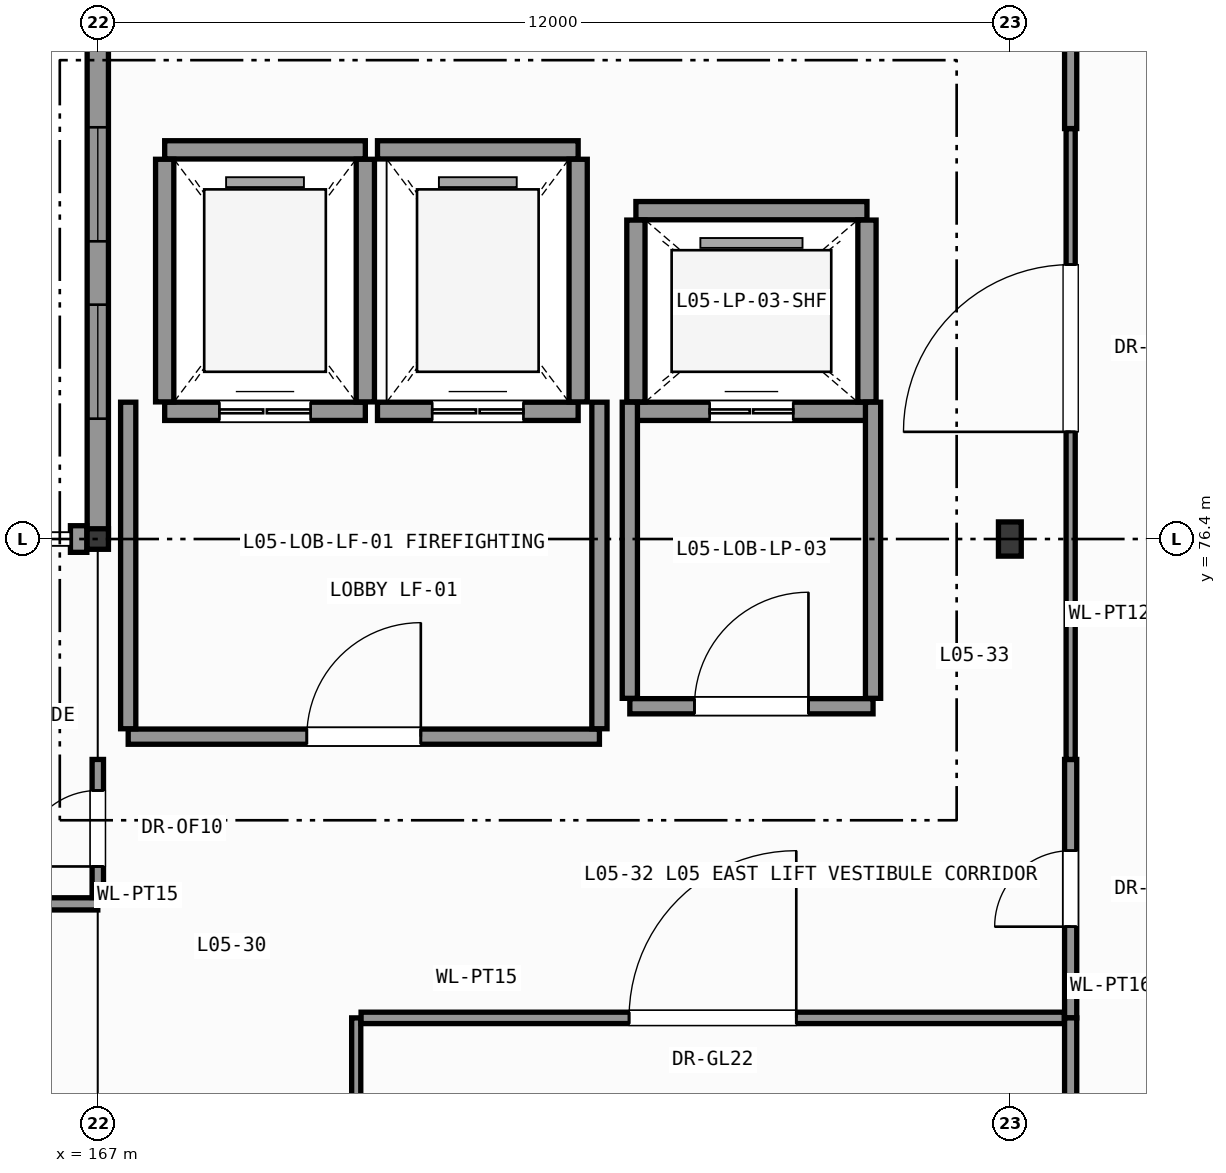
"""IFC4 building model, lengths in metres.
Left out: names, types, materials, properties, quantities, classifications, styles, units other than length and angle.
Written with IfcOpenShell. Run it as: python <this file> out.ifc"""

import sys

from ifc_helpers import new_model, si_unit, direction, frame, frame_2d, origin, origin_2d, place, context, subcontext, project, spatial, rectangle, i_section, extrude, element, fill, save


model = new_model("IFC4")
c1 = context("Model", 3, precision=1e-05, world=origin(), true_north=direction((0.0, 1.0)))
c2 = subcontext(c1, "Body", "Model", "MODEL_VIEW")
j1 = project(units=[si_unit("LENGTHUNIT", "METRE"), si_unit("PLANEANGLEUNIT", "RADIAN")], contexts=[c1])
p1 = place(None, origin())
s1 = spatial("IfcSite", under=j1, at=p1, CompositionType="ELEMENT")
p2 = place(p1, origin())
s2 = spatial("IfcBuilding", under=s1, at=p2, CompositionType="ELEMENT")
p3 = place(p2, frame((0.0, 0.0, 22.2)))
s3 = spatial("IfcBuildingStorey", under=s2, at=p3, CompositionType="ELEMENT", Elevation=22.2)
p4 = place(p3, frame((167.0, 76.4, 0.0), z_axis=(0.0, 0.0, 1.0), x_axis=(1.0, 0.0, 0.0)))
e1 = element("IfcColumn", 1, at=p4, inside=s3, PredefinedType="COLUMN", context=c2, shape_type="SweptSolid", body=[
    extrude(i_section(OverallWidth=0.28, OverallDepth=0.27, WebThickness=0.008, FlangeThickness=0.013, FilletRadius=0.024, at=origin_2d()), origin(), (0.0, 0.0, 1.0), 4.2),
])
p5 = place(p3, frame((179.0, 76.4, 0.0), z_axis=(0.0, 0.0, 1.0), x_axis=(1.0, 0.0, 0.0)))
e2 = element("IfcColumn", 2, at=p5, inside=s3, PredefinedType="COLUMN", context=c2, shape_type="SweptSolid", body=[
    extrude(i_section(OverallWidth=0.3, OverallDepth=0.45, WebThickness=0.014, FlangeThickness=0.026, FilletRadius=0.027, at=origin_2d()), origin(), (0.0, 0.0, 1.0), 4.2),
])
p6 = place(p3, frame((167.0, 76.4, 0.0), z_axis=(0.0, 0.0, 1.0), x_axis=(0.0, 1.0, 0.0)))
e3 = element("IfcWall", 3, at=p6, inside=s3, PredefinedType="SOLIDWALL", context=c2, shape_type="SweptSolid", body=[
    extrude(rectangle(XDim=7.0, YDim=0.28, at=frame_2d((3.5, 0.0))), origin(), (0.0, 0.0, 1.0), 3.675),
])
p7 = place(p6, frame((1.583, 0.0, 0.95)))
e4 = element("IfcOpeningElement", 4, at=p7, cuts=e3, PredefinedType="OPENING", context=c2, shape_type="SweptSolid", body=[
    extrude(rectangle(XDim=1.5, YDim=2.33, at=frame_2d((0.75, 1.165))), frame((0.0, 0.15, 0.0), z_axis=(0.0, -1.0, 0.0), x_axis=(1.0, 0.0, 0.0)), (0.0, 0.0, 1.0), 0.3),
])
p8 = place(p6, frame((3.917, 0.0, 0.95)))
e5 = element("IfcOpeningElement", 5, at=p8, cuts=e3, PredefinedType="OPENING", context=c2, shape_type="SweptSolid", body=[
    extrude(rectangle(XDim=1.5, YDim=2.33, at=frame_2d((0.75, 1.165))), frame((0.0, 0.15, 0.0), z_axis=(0.0, -1.0, 0.0), x_axis=(1.0, 0.0, 0.0)), (0.0, 0.0, 1.0), 0.3),
])
p9 = place(p3, frame((166.856, 76.4, 0.0), z_axis=(0.0, 0.0, 1.0), x_axis=(-1.0, 0.0, 0.0)))
e6 = element("IfcWall", 6, at=p9, inside=s3, PredefinedType="SOLIDWALL", context=c2, shape_type="SweptSolid", body=[
    extrude(rectangle(XDim=0.216, YDim=0.35, at=frame_2d((0.108, 0.0))), origin(), (0.0, 0.0, 1.0), 3.98),
])
p10 = place(p3, frame((167.88, 78.08, 0.0), z_axis=(0.0, 0.0, 1.0), x_axis=(1.0, 0.0, 0.0)))
e7 = element("IfcWall", 7, at=p10, inside=s3, PredefinedType="SHEAR", context=c2, shape_type="SweptSolid", body=[
    extrude(rectangle(XDim=2.64, YDim=0.24, at=frame_2d((1.32, 0.0))), origin(), (0.0, 0.0, 1.0), 3.98),
])
p11 = place(p10, frame((0.72, 0.0, 0.0)))
e8 = element("IfcOpeningElement", 8, at=p11, cuts=e7, PredefinedType="OPENING", context=c2, shape_type="SweptSolid", body=[
    extrude(rectangle(XDim=1.2, YDim=2.2, at=frame_2d((0.6, 1.1))), frame((0.0, 0.13, 0.0), z_axis=(0.0, -1.0, 0.0), x_axis=(1.0, 0.0, 0.0)), (0.0, 0.0, 1.0), 0.26),
])
p12 = place(p3, frame((167.88, 81.52, 0.0), z_axis=(0.0, 0.0, 1.0), x_axis=(1.0, 0.0, 0.0)))
e9 = element("IfcWall", 9, at=p12, inside=s3, PredefinedType="SHEAR", context=c2, shape_type="SweptSolid", body=[
    extrude(rectangle(XDim=2.64, YDim=0.24, at=frame_2d((1.32, 0.0))), origin(), (0.0, 0.0, 1.0), 3.98),
])
for number, where, z_axis, x_axis in (
    (10, (167.88, 78.204, 0.0), (0.0, 0.0, 1.0), (0.0, 1.0, 0.0)),
    (11, (170.52, 78.204, 0.0), (0.0, 0.0, 1.0), (0.0, 1.0, 0.0)),
):
    element("IfcWall", number, at=place(p3, frame(where, z_axis=z_axis, x_axis=x_axis)), inside=s3, PredefinedType="SHEAR", context=c2, shape_type="SweptSolid", body=[
        extrude(rectangle(XDim=3.192, YDim=0.24, at=frame_2d((1.596, 0.0))), origin(), (0.0, 0.0, 1.0), 3.98),
    ])
p13 = place(p3, frame((170.68, 78.08, 0.0), z_axis=(0.0, 0.0, 1.0), x_axis=(1.0, 0.0, 0.0)))
e12 = element("IfcWall", 12, at=p13, inside=s3, PredefinedType="SHEAR", context=c2, shape_type="SweptSolid", body=[
    extrude(rectangle(XDim=2.64, YDim=0.24, at=frame_2d((1.32, 0.0))), origin(), (0.0, 0.0, 1.0), 3.98),
])
p14 = place(p13, frame((0.72, 0.0, 0.0)))
e13 = element("IfcOpeningElement", 13, at=p14, cuts=e12, PredefinedType="OPENING", context=c2, shape_type="SweptSolid", body=[
    extrude(rectangle(XDim=1.2, YDim=2.2, at=frame_2d((0.6, 1.1))), frame((0.0, 0.13, 0.0), z_axis=(0.0, -1.0, 0.0), x_axis=(1.0, 0.0, 0.0)), (0.0, 0.0, 1.0), 0.26),
])
p15 = place(p3, frame((170.68, 81.52, 0.0), z_axis=(0.0, 0.0, 1.0), x_axis=(1.0, 0.0, 0.0)))
e14 = element("IfcWall", 14, at=p15, inside=s3, PredefinedType="SHEAR", context=c2, shape_type="SweptSolid", body=[
    extrude(rectangle(XDim=2.64, YDim=0.24, at=frame_2d((1.32, 0.0))), origin(), (0.0, 0.0, 1.0), 3.98),
])
p16 = place(p3, frame((173.32, 78.204, 0.0), z_axis=(0.0, 0.0, 1.0), x_axis=(0.0, 1.0, 0.0)))
e15 = element("IfcWall", 15, at=p16, inside=s3, PredefinedType="SHEAR", context=c2, shape_type="SweptSolid", body=[
    extrude(rectangle(XDim=3.192, YDim=0.24, at=frame_2d((1.596, 0.0))), origin(), (0.0, 0.0, 1.0), 3.98),
])
p17 = place(p3, frame((174.08, 78.08, 0.0), z_axis=(0.0, 0.0, 1.0), x_axis=(1.0, 0.0, 0.0)))
e16 = element("IfcWall", 16, at=p17, inside=s3, PredefinedType="SHEAR", context=c2, shape_type="SweptSolid", body=[
    extrude(rectangle(XDim=3.04, YDim=0.24, at=frame_2d((1.52, 0.0))), origin(), (0.0, 0.0, 1.0), 3.98),
])
p18 = place(p17, frame((0.97, 0.0, 0.0)))
e17 = element("IfcOpeningElement", 17, at=p18, cuts=e16, PredefinedType="OPENING", context=c2, shape_type="SweptSolid", body=[
    extrude(rectangle(XDim=1.1, YDim=2.2, at=frame_2d((0.55, 1.1))), frame((0.0, 0.13, 0.0), z_axis=(0.0, -1.0, 0.0), x_axis=(1.0, 0.0, 0.0)), (0.0, 0.0, 1.0), 0.26),
])
p19 = place(p3, frame((174.08, 80.72, 0.0), z_axis=(0.0, 0.0, 1.0), x_axis=(1.0, 0.0, 0.0)))
e18 = element("IfcWall", 18, at=p19, inside=s3, PredefinedType="SHEAR", context=c2, shape_type="SweptSolid", body=[
    extrude(rectangle(XDim=3.04, YDim=0.24, at=frame_2d((1.52, 0.0))), origin(), (0.0, 0.0, 1.0), 3.98),
])
for number, where, z_axis, x_axis in (
    (19, (174.08, 78.204, 0.0), (0.0, 0.0, 1.0), (0.0, 1.0, 0.0)),
    (20, (177.12, 78.204, 0.0), (0.0, 0.0, 1.0), (0.0, 1.0, 0.0)),
):
    element("IfcWall", number, at=place(p3, frame(where, z_axis=z_axis, x_axis=x_axis)), inside=s3, PredefinedType="SHEAR", context=c2, shape_type="SweptSolid", body=[
        extrude(rectangle(XDim=2.392, YDim=0.24, at=frame_2d((1.196, 0.0))), origin(), (0.0, 0.0, 1.0), 3.98),
    ])
p20 = place(p3, frame((167.4, 73.8, 0.0), z_axis=(0.0, 0.0, 1.0), x_axis=(1.0, 0.0, 0.0)))
e21 = element("IfcWall", 21, at=p20, inside=s3, PredefinedType="PARTITIONING", context=c2, shape_type="SweptSolid", body=[
    extrude(rectangle(XDim=6.2, YDim=0.2, at=frame_2d((3.1, 0.0))), origin(), (0.0, 0.0, 1.0), 3.605),
])
p21 = place(p20, frame((2.35, 0.0, 0.0)))
e22 = element("IfcOpeningElement", 22, at=p21, cuts=e21, PredefinedType="OPENING", context=c2, shape_type="SweptSolid", body=[
    extrude(rectangle(XDim=1.5, YDim=2.2, at=frame_2d((0.75, 1.1))), frame((0.0, 0.11, 0.0), z_axis=(0.0, -1.0, 0.0), x_axis=(1.0, 0.0, 0.0)), (0.0, 0.0, 1.0), 0.22),
])
for number, where, z_axis, x_axis in (
    (23, (167.4, 73.904, 0.0), (0.0, 0.0, 1.0), (0.0, 1.0, 0.0)),
    (24, (173.6, 73.904, 0.0), (0.0, 0.0, 1.0), (0.0, 1.0, 0.0)),
):
    element("IfcWall", number, at=place(p3, frame(where, z_axis=z_axis, x_axis=x_axis)), inside=s3, PredefinedType="PARTITIONING", context=c2, shape_type="SweptSolid", body=[
        extrude(rectangle(XDim=4.296, YDim=0.2, at=frame_2d((2.148, 0.0))), origin(), (0.0, 0.0, 1.0), 3.98),
    ])
p22 = place(p3, frame((174.0, 74.2, 0.0), z_axis=(0.0, 0.0, 1.0), x_axis=(1.0, 0.0, 0.0)))
e25 = element("IfcWall", 25, at=p22, inside=s3, PredefinedType="PARTITIONING", context=c2, shape_type="SweptSolid", body=[
    extrude(rectangle(XDim=3.2, YDim=0.2, at=frame_2d((1.6, 0.0))), origin(), (0.0, 0.0, 1.0), 3.98),
])
p23 = place(p22, frame((0.85, 0.0, 0.0)))
e26 = element("IfcOpeningElement", 26, at=p23, cuts=e25, PredefinedType="OPENING", context=c2, shape_type="SweptSolid", body=[
    extrude(rectangle(XDim=1.5, YDim=2.2, at=frame_2d((0.75, 1.1))), frame((0.0, 0.11, 0.0), z_axis=(0.0, -1.0, 0.0), x_axis=(1.0, 0.0, 0.0)), (0.0, 0.0, 1.0), 0.22),
])
for number, where, z_axis, x_axis in (
    (27, (174.0, 74.304, 0.0), (0.0, 0.0, 1.0), (0.0, 1.0, 0.0)),
    (28, (177.2, 74.304, 0.0), (0.0, 0.0, 1.0), (0.0, 1.0, 0.0)),
):
    element("IfcWall", number, at=place(p3, frame(where, z_axis=z_axis, x_axis=x_axis)), inside=s3, PredefinedType="PARTITIONING", context=c2, shape_type="SweptSolid", body=[
        extrude(rectangle(XDim=3.896, YDim=0.2, at=frame_2d((1.948, 0.0))), origin(), (0.0, 0.0, 1.0), 3.98),
    ])
p24 = place(p3, frame((155.0, 71.6, 0.0), z_axis=(0.0, 0.0, 1.0), x_axis=(1.0, 0.0, 0.0)))
e29 = element("IfcWall", 29, at=p24, inside=s3, PredefinedType="PARTITIONING", context=c2, shape_type="SweptSolid", body=[
    extrude(rectangle(XDim=12.0, YDim=0.16, at=frame_2d((6.0, 0.0))), origin(), (0.0, 0.0, 1.0), 3.98),
])
p25 = place(p24, frame((4.9, 0.0, 0.0)))
e30 = element("IfcOpeningElement", 30, at=p25, cuts=e29, PredefinedType="OPENING", context=c2, shape_type="SweptSolid", body=[
    extrude(rectangle(XDim=2.2, YDim=2.6, at=frame_2d((1.1, 1.3))), frame((0.0, 0.09, 0.0), z_axis=(0.0, -1.0, 0.0), x_axis=(1.0, 0.0, 0.0)), (0.0, 0.0, 1.0), 0.18),
])
p26 = place(p3, frame((167.0, 71.684, 0.0), z_axis=(0.0, 0.0, 1.0), x_axis=(0.0, 1.0, 0.0)))
e31 = element("IfcWall", 31, at=p26, inside=s3, PredefinedType="PARTITIONING", context=c2, shape_type="SweptSolid", body=[
    extrude(rectangle(XDim=1.816, YDim=0.15, at=frame_2d((0.908, 0.0))), origin(), (0.0, 0.0, 1.0), 3.525),
])
p27 = place(p26, frame((0.408, 0.0, 0.0)))
e32 = element("IfcOpeningElement", 32, at=p27, cuts=e31, PredefinedType="OPENING", context=c2, shape_type="SweptSolid", body=[
    extrude(rectangle(XDim=1.0, YDim=2.15, at=frame_2d((0.5, 1.075))), frame((0.0, 0.085, 0.0), z_axis=(0.0, -1.0, 0.0), x_axis=(1.0, 0.0, 0.0)), (0.0, 0.0, 1.0), 0.17),
])
p28 = place(p3, frame((170.4, 57.4, 0.0), z_axis=(0.0, 0.0, 1.0), x_axis=(0.0, 1.0, 0.0)))
e33 = element("IfcWall", 33, at=p28, inside=s3, PredefinedType="PARTITIONING", context=c2, shape_type="SweptSolid", body=[
    extrude(rectangle(XDim=12.7, YDim=0.12, at=frame_2d((6.35, 0.0))), origin(), (0.0, 0.0, 1.0), 3.98),
])
p29 = place(p28, frame((5.25, 0.0, 0.0)))
e34 = element("IfcOpeningElement", 34, at=p29, cuts=e33, PredefinedType="OPENING", context=c2, shape_type="SweptSolid", body=[
    extrude(rectangle(XDim=2.2, YDim=2.6, at=frame_2d((1.1, 1.3))), frame((0.0, 0.07, 0.0), z_axis=(0.0, -1.0, 0.0), x_axis=(1.0, 0.0, 0.0)), (0.0, 0.0, 1.0), 0.14),
])
p30 = place(p3, frame((179.8, 70.1, 0.0), z_axis=(0.0, 0.0, 1.0), x_axis=(0.0, 1.0, 0.0)))
e35 = element("IfcWall", 35, at=p30, inside=s3, PredefinedType="PARTITIONING", context=c2, shape_type="SweptSolid", body=[
    extrude(rectangle(XDim=3.4, YDim=0.16, at=frame_2d((1.7, 0.0))), origin(), (0.0, 0.0, 1.0), 3.98),
])
p31 = place(p30, frame((1.2, 0.0, 0.0)))
e36 = element("IfcOpeningElement", 36, at=p31, cuts=e35, PredefinedType="OPENING", context=c2, shape_type="SweptSolid", body=[
    extrude(rectangle(XDim=1.0, YDim=2.15, at=frame_2d((0.5, 1.075))), frame((0.0, 0.09, 0.0), z_axis=(0.0, -1.0, 0.0), x_axis=(1.0, 0.0, 0.0)), (0.0, 0.0, 1.0), 0.18),
])
p32 = place(p3, frame((170.464, 70.1, 0.0), z_axis=(0.0, 0.0, 1.0), x_axis=(1.0, 0.0, 0.0)))
e37 = element("IfcWall", 37, at=p32, inside=s3, PredefinedType="PARTITIONING", context=c2, shape_type="SweptSolid", body=[
    extrude(rectangle(XDim=9.252, YDim=0.15, at=frame_2d((4.626, 0.0))), origin(), (0.0, 0.0, 1.0), 3.98),
])
p33 = place(p32, frame((3.526, 0.0, 0.0)))
e38 = element("IfcOpeningElement", 38, at=p33, cuts=e37, PredefinedType="OPENING", context=c2, shape_type="SweptSolid", body=[
    extrude(rectangle(XDim=2.2, YDim=2.6, at=frame_2d((1.1, 1.3))), frame((0.0, 0.085, 0.0), z_axis=(0.0, -1.0, 0.0), x_axis=(1.0, 0.0, 0.0)), (0.0, 0.0, 1.0), 0.17),
])
p34 = place(p3, frame((179.8, 73.5, 0.0), z_axis=(0.0, 0.0, 1.0), x_axis=(0.0, 1.0, 0.0)))
e39 = element("IfcWall", 39, at=p34, inside=s3, PredefinedType="PARTITIONING", context=c2, shape_type="SweptSolid", body=[
    extrude(rectangle(XDim=8.3, YDim=0.12, at=frame_2d((4.15, 0.0))), origin(), (0.0, 0.0, 1.0), 3.98),
])
p35 = place(p34, frame((4.31, 0.0, 0.0)))
e40 = element("IfcOpeningElement", 40, at=p35, cuts=e39, PredefinedType="OPENING", context=c2, shape_type="SweptSolid", body=[
    extrude(rectangle(XDim=2.2, YDim=2.6, at=frame_2d((1.1, 1.3))), frame((0.0, 0.07, 0.0), z_axis=(0.0, -1.0, 0.0), x_axis=(1.0, 0.0, 0.0)), (0.0, 0.0, 1.0), 0.14),
])
p36 = place(p3, frame((179.8, 81.8, 0.0), z_axis=(0.0, 0.0, 1.0), x_axis=(0.0, 1.0, 0.0)))
e41 = element("IfcWall", 41, at=p36, inside=s3, PredefinedType="PARTITIONING", context=c2, shape_type="SweptSolid", body=[
    extrude(rectangle(XDim=1.6, YDim=0.16, at=frame_2d((0.8, 0.0))), origin(), (0.0, 0.0, 1.0), 3.98),
])
p37 = place(p3, frame((179.8, 57.4, 0.0), z_axis=(0.0, 0.0, 1.0), x_axis=(0.0, 1.0, 0.0)))
e42 = element("IfcWall", 42, at=p37, inside=s3, PredefinedType="PARTITIONING", context=c2, shape_type="SweptSolid", body=[
    extrude(rectangle(XDim=12.7, YDim=0.16, at=frame_2d((6.35, 0.0))), origin(), (0.0, 0.0, 1.0), 3.98),
])
p38 = place(p37, frame((5.25, 0.0, 0.0)))
e43 = element("IfcOpeningElement", 43, at=p38, cuts=e42, PredefinedType="OPENING", context=c2, shape_type="SweptSolid", body=[
    extrude(rectangle(XDim=2.2, YDim=2.6, at=frame_2d((1.1, 1.3))), frame((0.0, 0.09, 0.0), z_axis=(0.0, -1.0, 0.0), x_axis=(1.0, 0.0, 0.0)), (0.0, 0.0, 1.0), 0.18),
])
p39 = place(p7, origin())
e44 = element("IfcWindow", 44, at=p39, inside=s3, PartitioningType="SINGLE_PANEL", PredefinedType="WINDOW", context=c2, shape_type="SweptSolid", body=[
    extrude(rectangle(XDim=1.5, YDim=2.33, at=frame_2d((0.75, 1.165))), frame((0.0, 0.03, 0.0), z_axis=(0.0, -1.0, 0.0), x_axis=(1.0, 0.0, 0.0)), (0.0, 0.0, 1.0), 0.06),
])
fill(e4, e44)
p40 = place(p8, origin())
e45 = element("IfcWindow", 45, at=p40, inside=s3, PartitioningType="SINGLE_PANEL", PredefinedType="WINDOW", context=c2, shape_type="SweptSolid", body=[
    extrude(rectangle(XDim=1.5, YDim=2.33, at=frame_2d((0.75, 1.165))), frame((0.0, 0.03, 0.0), z_axis=(0.0, -1.0, 0.0), x_axis=(1.0, 0.0, 0.0)), (0.0, 0.0, 1.0), 0.06),
])
fill(e5, e45)
p41 = place(p11, origin())
e46 = element("IfcDoor", 46, at=p41, inside=s3, OperationType="DOUBLE_DOOR_SLIDING", PredefinedType="DOOR", context=c2, shape_type="SweptSolid", body=[
    extrude(rectangle(XDim=1.2, YDim=2.2, at=frame_2d((0.6, 1.1))), frame((0.0, 0.025, 0.0), z_axis=(0.0, -1.0, 0.0), x_axis=(1.0, 0.0, 0.0)), (0.0, 0.0, 1.0), 0.05),
])
fill(e8, e46)
p42 = place(p14, origin())
e47 = element("IfcDoor", 47, at=p42, inside=s3, OperationType="DOUBLE_DOOR_SLIDING", PredefinedType="DOOR", context=c2, shape_type="SweptSolid", body=[
    extrude(rectangle(XDim=1.2, YDim=2.2, at=frame_2d((0.6, 1.1))), frame((0.0, 0.025, 0.0), z_axis=(0.0, -1.0, 0.0), x_axis=(1.0, 0.0, 0.0)), (0.0, 0.0, 1.0), 0.05),
])
fill(e13, e47)
p43 = place(p18, origin())
e48 = element("IfcDoor", 48, at=p43, inside=s3, OperationType="DOUBLE_DOOR_SLIDING", PredefinedType="DOOR", context=c2, shape_type="SweptSolid", body=[
    extrude(rectangle(XDim=1.1, YDim=2.2, at=frame_2d((0.55, 1.1))), frame((0.0, 0.025, 0.0), z_axis=(0.0, -1.0, 0.0), x_axis=(1.0, 0.0, 0.0)), (0.0, 0.0, 1.0), 0.05),
])
fill(e17, e48)
p44 = place(p21, origin())
e49 = element("IfcDoor", 49, at=p44, inside=s3, OperationType="SINGLE_SWING_RIGHT", PredefinedType="DOOR", context=c2, shape_type="SweptSolid", body=[
    extrude(rectangle(XDim=1.5, YDim=2.2, at=frame_2d((0.75, 1.1))), frame((0.0, 0.025, 0.0), z_axis=(0.0, -1.0, 0.0), x_axis=(1.0, 0.0, 0.0)), (0.0, 0.0, 1.0), 0.05),
])
fill(e22, e49)
p45 = place(p23, origin())
e50 = element("IfcDoor", 50, at=p45, inside=s3, OperationType="SINGLE_SWING_RIGHT", PredefinedType="DOOR", context=c2, shape_type="SweptSolid", body=[
    extrude(rectangle(XDim=1.5, YDim=2.2, at=frame_2d((0.75, 1.1))), frame((0.0, 0.025, 0.0), z_axis=(0.0, -1.0, 0.0), x_axis=(1.0, 0.0, 0.0)), (0.0, 0.0, 1.0), 0.05),
])
fill(e26, e50)
p46 = place(p27, origin())
e51 = element("IfcDoor", 51, at=p46, inside=s3, OperationType="SINGLE_SWING_LEFT", PredefinedType="DOOR", context=c2, shape_type="SweptSolid", body=[
    extrude(rectangle(XDim=1.0, YDim=2.15, at=frame_2d((0.5, 1.075))), frame((0.0, 0.025, 0.0), z_axis=(0.0, -1.0, 0.0), x_axis=(1.0, 0.0, 0.0)), (0.0, 0.0, 1.0), 0.05),
])
fill(e32, e51)
p47 = place(p31, origin())
e52 = element("IfcDoor", 52, at=p47, inside=s3, OperationType="SINGLE_SWING_LEFT", PredefinedType="DOOR", context=c2, shape_type="SweptSolid", body=[
    extrude(rectangle(XDim=1.0, YDim=2.15, at=frame_2d((0.5, 1.075))), frame((0.0, 0.025, 0.0), z_axis=(0.0, -1.0, 0.0), x_axis=(1.0, 0.0, 0.0)), (0.0, 0.0, 1.0), 0.05),
])
fill(e36, e52)
p48 = place(p33, origin())
e53 = element("IfcDoor", 53, at=p48, inside=s3, OperationType="SINGLE_SWING_RIGHT", PredefinedType="DOOR", context=c2, shape_type="SweptSolid", body=[
    extrude(rectangle(XDim=2.2, YDim=2.6, at=frame_2d((1.1, 1.3))), frame((0.0, 0.025, 0.0), z_axis=(0.0, -1.0, 0.0), x_axis=(1.0, 0.0, 0.0)), (0.0, 0.0, 1.0), 0.05),
])
fill(e38, e53)
p49 = place(p35, origin())
e54 = element("IfcDoor", 54, at=p49, inside=s3, OperationType="SINGLE_SWING_LEFT", PredefinedType="DOOR", context=c2, shape_type="SweptSolid", body=[
    extrude(rectangle(XDim=2.2, YDim=2.6, at=frame_2d((1.1, 1.3))), frame((0.0, 0.025, 0.0), z_axis=(0.0, -1.0, 0.0), x_axis=(1.0, 0.0, 0.0)), (0.0, 0.0, 1.0), 0.05),
])
fill(e40, e54)
save(model, sys.argv[1])
